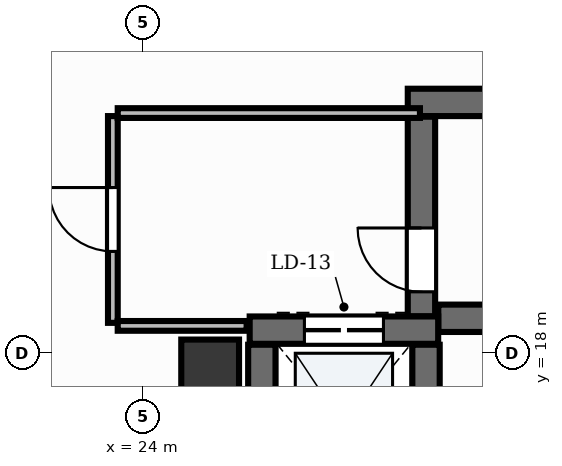
"""IFC4 building model, lengths in metres.
Left out: names, types, materials, properties, quantities, classifications, styles, units other than length and angle.
Written with IfcOpenShell. Run it as: python <this file> out.ifc"""

import sys

from ifc_helpers import new_model, si_unit, direction, frame, frame_2d, origin, origin_2d, place, context, subcontext, project, spatial, rectangle, extrude, element, fill, save


model = new_model("IFC4")
c1 = context("Model", 3, precision=1e-05, world=origin(), true_north=direction((0.0, 1.0)))
c2 = subcontext(c1, "Body", "Model", "MODEL_VIEW")
j1 = project(units=[si_unit("LENGTHUNIT", "METRE"), si_unit("PLANEANGLEUNIT", "RADIAN")], contexts=[c1])
p1 = place(None, origin())
s1 = spatial("IfcSite", under=j1, at=p1, CompositionType="ELEMENT")
p2 = place(p1, origin())
s2 = spatial("IfcBuilding", under=s1, at=p2, CompositionType="ELEMENT")
p3 = place(p2, frame((0.0, 0.0, 15.0)))
s3 = spatial("IfcBuildingStorey", under=s2, at=p3, CompositionType="ELEMENT", Elevation=15.0)
p4 = place(p3, frame((28.852, 18.575, 0.0), z_axis=(0.0, 0.0, 1.0), x_axis=(1.0, 0.0, 0.0)))
e1 = element("IfcWall", 1, at=p4, inside=s3, PredefinedType="SHEAR", context=c2, shape_type="SweptSolid", body=[
    extrude(rectangle(XDim=8.248, YDim=0.45, at=frame_2d((4.124, 0.0))), origin(), (0.0, 0.0, 1.0), 5.05),
])
p5 = place(p3, frame((28.35, 22.125, 0.0), z_axis=(0.0, 0.0, 1.0), x_axis=(1.0, 0.0, 0.0)))
e2 = element("IfcWall", 2, at=p5, inside=s3, PredefinedType="SHEAR", context=c2, shape_type="SweptSolid", body=[
    extrude(rectangle(XDim=8.75, YDim=0.45, at=frame_2d((4.375, 0.0))), origin(), (0.0, 0.0, 1.0), 5.05),
])
p6 = place(p3, frame((28.575, 18.607, 0.0), z_axis=(0.0, 0.0, 1.0), x_axis=(0.0, 1.0, 0.0)))
e3 = element("IfcWall", 3, at=p6, inside=s3, PredefinedType="SHEAR", context=c2, shape_type="SweptSolid", body=[
    extrude(rectangle(XDim=3.283, YDim=0.45, at=frame_2d((1.642, 0.0))), origin(), (0.0, 0.0, 1.0), 5.05),
])
p7 = place(p6, frame((0.403, 0.0, 0.0)))
e4 = element("IfcOpeningElement", 4, at=p7, cuts=e3, PredefinedType="OPENING", context=c2, shape_type="SweptSolid", body=[
    extrude(rectangle(XDim=1.05, YDim=2.15, at=frame_2d((0.525, 1.075))), frame((0.0, 0.24, 0.0), z_axis=(0.0, -1.0, 0.0), x_axis=(1.0, 0.0, 0.0)), (0.0, 0.0, 1.0), 0.48),
])
p8 = place(p3, frame((25.75, 18.38, 0.0), z_axis=(0.0, 0.0, 1.0), x_axis=(1.0, 0.0, 0.0)))
e5 = element("IfcWall", 5, at=p8, inside=s3, PredefinedType="SHEAR", context=c2, shape_type="SweptSolid", body=[
    extrude(rectangle(XDim=3.1, YDim=0.45, at=frame_2d((1.55, 0.0))), origin(), (0.0, 0.0, 1.0), 5.05),
])
p9 = place(p8, frame((0.9, 0.0, 0.0)))
e6 = element("IfcOpeningElement", 6, at=p9, cuts=e5, PredefinedType="OPENING", context=c2, shape_type="SweptSolid", body=[
    extrude(rectangle(XDim=1.3, YDim=2.2, at=frame_2d((0.65, 1.1))), frame((0.0, 0.24, 0.0), z_axis=(0.0, -1.0, 0.0), x_axis=(1.0, 0.0, 0.0)), (0.0, 0.0, 1.0), 0.48),
])
for number, where, z_axis, x_axis in (
    (7, (25.95, 15.44, 0.0), (0.0, 0.0, 1.0), (0.0, 1.0, 0.0)),
    (8, (28.65, 15.44, 0.0), (0.0, 0.0, 1.0), (0.0, 1.0, 0.0)),
):
    element("IfcWall", number, at=place(p3, frame(where, z_axis=z_axis, x_axis=x_axis)), inside=s3, PredefinedType="SHEAR", context=c2, shape_type="SweptSolid", body=[
        extrude(rectangle(XDim=2.7, YDim=0.45, at=frame_2d((1.35, 0.0))), origin(), (0.0, 0.0, 1.0), 5.05),
    ])
p10 = place(p3, frame((25.1, 17.75, -0.0), z_axis=(0.0, 0.0, 1.0), x_axis=(1.0, 0.0, 0.0)))
e9 = element("IfcColumn", 9, at=p10, inside=s3, PredefinedType="PILASTER", context=c2, shape_type="SweptSolid", body=[
    extrude(rectangle(XDim=0.95, YDim=0.95, at=origin_2d()), origin(), (0.0, 0.0, 1.0), 5.051),
])
p11 = place(p3, frame((23.5, 18.5, 0.0), z_axis=(0.0, 0.0, 1.0), x_axis=(0.0, 1.0, 0.0)))
e10 = element("IfcWall", 10, at=p11, inside=s3, PredefinedType="PARTITIONING", context=c2, shape_type="SweptSolid", body=[
    extrude(rectangle(XDim=3.4, YDim=0.16, at=frame_2d((1.7, 0.0))), origin(), (0.0, 0.0, 1.0), 3.36),
])
p12 = place(p11, frame((1.175, 0.0, 0.0)))
e11 = element("IfcOpeningElement", 11, at=p12, cuts=e10, PredefinedType="OPENING", context=c2, shape_type="SweptSolid", body=[
    extrude(rectangle(XDim=1.05, YDim=2.15, at=frame_2d((0.525, 1.075))), frame((0.0, 0.095, 0.0), z_axis=(0.0, -1.0, 0.0), x_axis=(1.0, 0.0, 0.0)), (0.0, 0.0, 1.0), 0.19),
])
p13 = place(p3, frame((23.58, 21.95, 0.0), z_axis=(0.0, 0.0, 1.0), x_axis=(1.0, 0.0, 0.0)))
e12 = element("IfcWall", 12, at=p13, inside=s3, PredefinedType="PARTITIONING", context=c2, shape_type="SweptSolid", body=[
    extrude(rectangle(XDim=4.97, YDim=0.16, at=frame_2d((2.485, 0.0))), origin(), (0.0, 0.0, 1.0), 3.36),
])
p14 = place(p3, frame((23.58, 18.45, 0.0), z_axis=(0.0, 0.0, 1.0), x_axis=(1.0, 0.0, 0.0)))
e13 = element("IfcWall", 13, at=p14, inside=s3, PredefinedType="PARTITIONING", context=c2, shape_type="SweptSolid", body=[
    extrude(rectangle(XDim=2.12, YDim=0.16, at=frame_2d((1.06, 0.0))), origin(), (0.0, 0.0, 1.0), 3.36),
])
p15 = place(p7, origin())
e14 = element("IfcDoor", 14, at=p15, inside=s3, OperationType="SINGLE_SWING_RIGHT", PredefinedType="DOOR", context=c2, shape_type="SweptSolid", body=[
    extrude(rectangle(XDim=1.05, YDim=2.15, at=frame_2d((0.525, 1.075))), frame((0.0, 0.025, 0.0), z_axis=(0.0, -1.0, 0.0), x_axis=(1.0, 0.0, 0.0)), (0.0, 0.0, 1.0), 0.05),
])
fill(e4, e14)
p16 = place(p9, origin())
e15 = element("IfcDoor", 15, at=p16, inside=s3, OperationType="DOUBLE_DOOR_SLIDING", PredefinedType="DOOR", context=c2, shape_type="SweptSolid", body=[
    extrude(rectangle(XDim=1.3, YDim=2.2, at=frame_2d((0.65, 1.1))), frame((0.0, 0.025, 0.0), z_axis=(0.0, -1.0, 0.0), x_axis=(1.0, 0.0, 0.0)), (0.0, 0.0, 1.0), 0.05),
])
fill(e6, e15)
p17 = place(p12, origin())
e16 = element("IfcDoor", 16, at=p17, inside=s3, OperationType="SINGLE_SWING_RIGHT", PredefinedType="DOOR", context=c2, shape_type="SweptSolid", body=[
    extrude(rectangle(XDim=1.05, YDim=2.15, at=frame_2d((0.525, 1.075))), frame((0.0, 0.025, 0.0), z_axis=(0.0, -1.0, 0.0), x_axis=(1.0, 0.0, 0.0)), (0.0, 0.0, 1.0), 0.05),
])
fill(e11, e16)
save(model, sys.argv[1])
